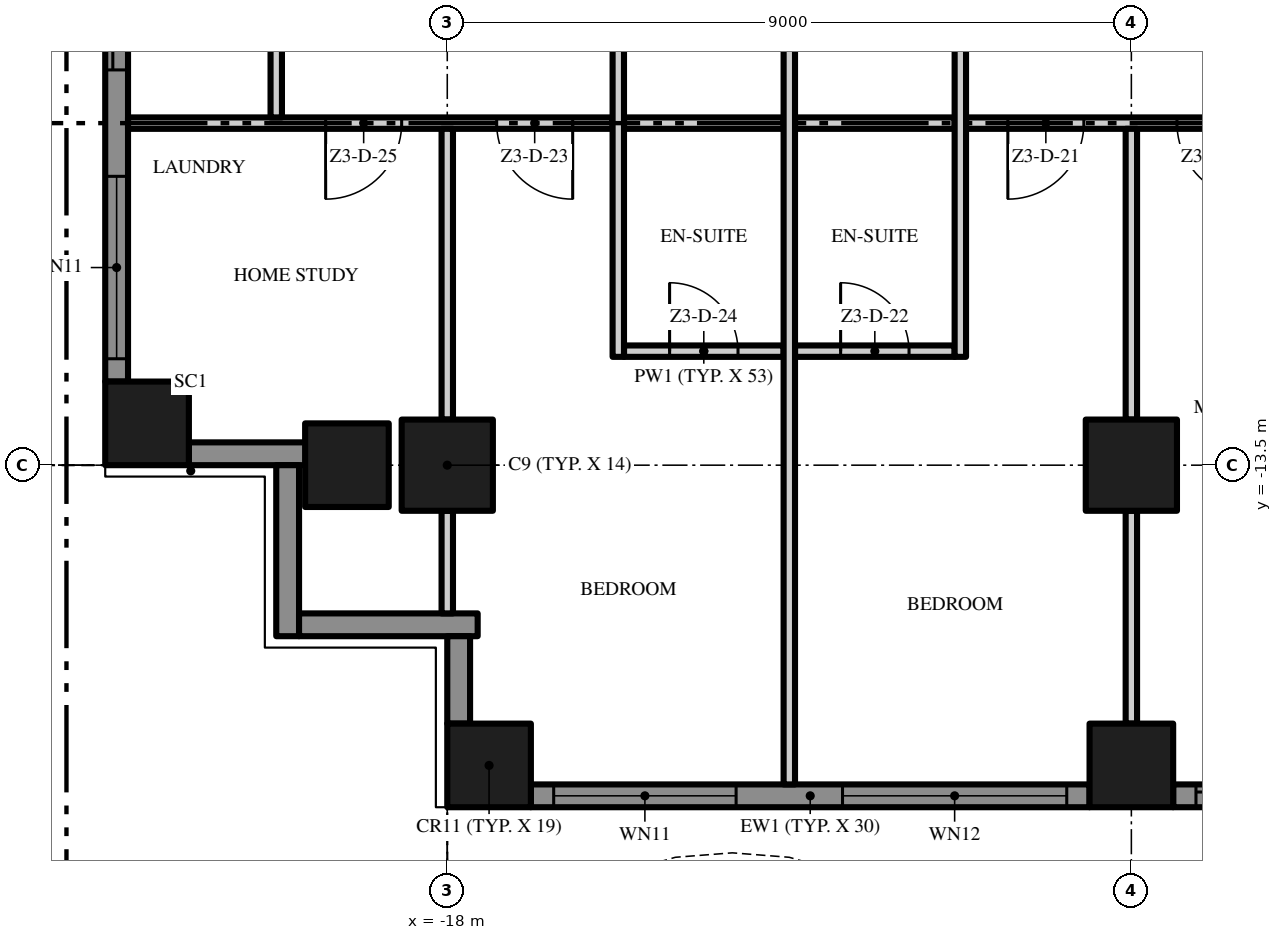
"""IFC4 building model, lengths in metres.
Left out: names, types, materials, properties, quantities, classifications, styles, units other than length and angle.
Written with IfcOpenShell. Run it as: python <this file> out.ifc"""

import sys

from ifc_helpers import new_model, si_unit, direction, frame, frame_2d, origin, origin_2d, place, context, subcontext, project, spatial, polyline, rectangle, outline, extrude, element, fill, save


model = new_model("IFC4")
c1 = context("Model", 3, precision=1e-05, world=origin(), true_north=direction((0.0, 1.0)))
c2 = subcontext(c1, "Body", "Model", "MODEL_VIEW")
j1 = project(units=[si_unit("LENGTHUNIT", "METRE"), si_unit("PLANEANGLEUNIT", "RADIAN")], contexts=[c1])
p1 = place(None, origin())
s1 = spatial("IfcSite", under=j1, at=p1, CompositionType="ELEMENT")
p2 = place(p1, origin())
s2 = spatial("IfcBuilding", under=s1, at=p2, CompositionType="ELEMENT")
p3 = place(p2, frame((0.0, 0.0, 159.2)))
s3 = spatial("IfcBuildingStorey", under=s2, at=p3, CompositionType="ELEMENT", Elevation=159.2)
p4 = place(p3, frame((-18.0, -13.5, 0.0), z_axis=(0.0, 0.0, 1.0), x_axis=(1.0, 0.0, 0.0)))
e1 = element("IfcColumn", 1, at=p4, inside=s3, PredefinedType="COLUMN", context=c2, shape_type="SweptSolid", body=[
    extrude(rectangle(XDim=1.2, YDim=1.2, at=origin_2d()), origin(), (0.0, 0.0, 1.0), 3.5),
])
for number, where, z_axis, x_axis in (
    (2, (-17.45, -17.45, 0.0), (0.0, 0.0, 1.0), (1.0, 0.0, 0.0)),
    (3, (-21.95, -12.95, 0.0), (0.0, 0.0, 1.0), (1.0, 0.0, 0.0)),
    (4, (-19.32, -13.5, 0.0), (0.0, 0.0, 1.0), (1.0, 0.0, 0.0)),
):
    element("IfcColumn", number, at=place(p3, frame(where, z_axis=z_axis, x_axis=x_axis)), inside=s3, PredefinedType="COLUMN", context=c2, shape_type="SweptSolid", body=[
        extrude(rectangle(XDim=1.1, YDim=1.1, at=origin_2d()), origin(), (0.0, 0.0, 1.0), 3.5),
    ])
p5 = place(p3, frame((-9.0, -13.5, 0.0), z_axis=(0.0, 0.0, 1.0), x_axis=(1.0, 0.0, 0.0)))
e5 = element("IfcColumn", 5, at=p5, inside=s3, PredefinedType="COLUMN", context=c2, shape_type="SweptSolid", body=[
    extrude(rectangle(XDim=1.2, YDim=1.2, at=origin_2d()), origin(), (0.0, 0.0, 1.0), 3.5),
])
p6 = place(p3, frame((-9.0, -17.45, 0.0), z_axis=(0.0, 0.0, 1.0), x_axis=(1.0, 0.0, 0.0)))
e6 = element("IfcColumn", 6, at=p6, inside=s3, PredefinedType="COLUMN", context=c2, shape_type="SweptSolid", body=[
    extrude(rectangle(XDim=1.1, YDim=1.1, at=origin_2d()), origin(), (0.0, 0.0, 1.0), 3.5),
])
p7 = place(p3, frame((-9.55, -17.85, 0.0), z_axis=(0.0, 0.0, 1.0), x_axis=(-1.0, 0.0, 0.0)))
e7 = element("IfcWall", 7, at=p7, inside=s3, PredefinedType="SOLIDWALL", context=c2, shape_type="SweptSolid", body=[
    extrude(rectangle(XDim=7.35, YDim=0.3, at=frame_2d((3.675, 0.0))), origin(), (0.0, 0.0, 1.0), 3.5),
])
p8 = place(p7, frame((4.65, 0.0, 0.45)))
e8 = element("IfcOpeningElement", 8, at=p8, cuts=e7, PredefinedType="OPENING", context=c2, shape_type="SweptSolid", body=[
    extrude(rectangle(XDim=2.4, YDim=2.65, at=frame_2d((1.2, 1.325))), frame((0.0, 0.16, 0.0), z_axis=(0.0, -1.0, 0.0), x_axis=(1.0, 0.0, 0.0)), (0.0, 0.0, 1.0), 0.32),
])
p9 = place(p7, frame((0.3, 0.0, 0.45)))
e9 = element("IfcOpeningElement", 9, at=p9, cuts=e7, PredefinedType="OPENING", context=c2, shape_type="SweptSolid", body=[
    extrude(rectangle(XDim=2.95, YDim=2.65, at=frame_2d((1.475, 1.325))), frame((0.0, 0.16, 0.0), z_axis=(0.0, -1.0, 0.0), x_axis=(1.0, 0.0, 0.0)), (0.0, 0.0, 1.0), 0.32),
])
p10 = place(p3, frame((-0.55, -17.85, 0.0), z_axis=(0.0, 0.0, 1.0), x_axis=(-1.0, 0.0, 0.0)))
e10 = element("IfcWall", 10, at=p10, inside=s3, PredefinedType="SOLIDWALL", context=c2, shape_type="SweptSolid", body=[
    extrude(rectangle(XDim=7.9, YDim=0.3, at=frame_2d((3.95, 0.0))), origin(), (0.0, 0.0, 1.0), 3.5),
])
p11 = place(p10, frame((4.65, 0.0, 0.0)))
e11 = element("IfcOpeningElement", 11, at=p11, cuts=e10, PredefinedType="OPENING", context=c2, shape_type="SweptSolid", body=[
    extrude(rectangle(XDim=2.95, YDim=2.4, at=frame_2d((1.475, 1.2))), frame((0.0, 0.16, 0.0), z_axis=(0.0, -1.0, 0.0), x_axis=(1.0, 0.0, 0.0)), (0.0, 0.0, 1.0), 0.32),
])
p12 = place(p10, frame((0.3, 0.0, 0.45)))
e12 = element("IfcOpeningElement", 12, at=p12, cuts=e10, PredefinedType="OPENING", context=c2, shape_type="SweptSolid", body=[
    extrude(rectangle(XDim=2.95, YDim=2.65, at=frame_2d((1.475, 1.325))), frame((0.0, 0.16, 0.0), z_axis=(0.0, -1.0, 0.0), x_axis=(1.0, 0.0, 0.0)), (0.0, 0.0, 1.0), 0.32),
])
p13 = place(p3, frame((-22.35, -12.4, 0.0), z_axis=(0.0, 0.0, 1.0), x_axis=(0.0, 1.0, 0.0)))
e13 = element("IfcWall", 13, at=p13, inside=s3, PredefinedType="SOLIDWALL", context=c2, shape_type="SweptSolid", body=[
    extrude(rectangle(XDim=7.35, YDim=0.3, at=frame_2d((3.675, 0.0))), origin(), (0.0, 0.0, 1.0), 3.5),
])
p14 = place(p13, frame((4.1, 0.0, 0.0)))
e14 = element("IfcOpeningElement", 14, at=p14, cuts=e13, PredefinedType="OPENING", context=c2, shape_type="SweptSolid", body=[
    extrude(rectangle(XDim=2.95, YDim=2.4, at=frame_2d((1.475, 1.2))), frame((0.0, 0.16, 0.0), z_axis=(0.0, -1.0, 0.0), x_axis=(1.0, 0.0, 0.0)), (0.0, 0.0, 1.0), 0.32),
])
p15 = place(p13, frame((0.3, 0.0, 0.45)))
e15 = element("IfcOpeningElement", 15, at=p15, cuts=e13, PredefinedType="OPENING", context=c2, shape_type="SweptSolid", body=[
    extrude(rectangle(XDim=2.4, YDim=2.65, at=frame_2d((1.2, 1.325))), frame((0.0, 0.16, 0.0), z_axis=(0.0, -1.0, 0.0), x_axis=(1.0, 0.0, 0.0)), (0.0, 0.0, 1.0), 0.32),
])
p16 = place(p3, frame((-19.85, -13.35, 0.0), z_axis=(0.0, 0.0, 1.0), x_axis=(-1.0, 0.0, 0.0)))
e16 = element("IfcWall", 16, at=p16, inside=s3, PredefinedType="SOLIDWALL", context=c2, shape_type="SweptSolid", body=[
    extrude(rectangle(XDim=1.55, YDim=0.3, at=frame_2d((0.775, 0.0))), origin(), (0.0, 0.0, 1.0), 3.5),
])
p17 = place(p3, frame((-20.1, -15.75, 0.0), z_axis=(0.0, 0.0, 1.0), x_axis=(0.0, 1.0, 0.0)))
e17 = element("IfcWall", 17, at=p17, inside=s3, PredefinedType="SOLIDWALL", context=c2, shape_type="SweptSolid", body=[
    extrude(rectangle(XDim=2.25, YDim=0.3, at=frame_2d((1.125, 0.0))), origin(), (0.0, 0.0, 1.0), 3.5),
])
p18 = place(p3, frame((-17.6, -15.6, 0.0), z_axis=(0.0, 0.0, 1.0), x_axis=(-1.0, 0.0, 0.0)))
e18 = element("IfcWall", 18, at=p18, inside=s3, PredefinedType="SOLIDWALL", context=c2, shape_type="SweptSolid", body=[
    extrude(rectangle(XDim=2.35, YDim=0.3, at=frame_2d((1.175, 0.0))), origin(), (0.0, 0.0, 1.0), 3.5),
])
p19 = place(p3, frame((-17.85, -16.9, 0.0), z_axis=(0.0, 0.0, 1.0), x_axis=(0.0, 1.0, 0.0)))
e19 = element("IfcWall", 19, at=p19, inside=s3, PredefinedType="SOLIDWALL", context=c2, shape_type="SweptSolid", body=[
    extrude(rectangle(XDim=1.15, YDim=0.3, at=frame_2d((0.575, 0.0))), origin(), (0.0, 0.0, 1.0), 3.5),
])
p20 = place(p3, origin())
e20 = element("IfcWall", 20, at=p20, inside=s3, PredefinedType="USERDEFINED", context=c2, shape_type="SweptSolid", body=[
    extrude(outline(polyline([(-18.0, -19.8), (-16.5, -19.095), (-15.0, -18.659), (-14.25, -18.6), (-13.5, -18.659), (-12.0, -19.095), (-10.5, -19.8), (-9.0, -20.505), (-7.5, -20.941), (-6.75, -21.0), (-6.0, -20.941), (-4.5, -20.505), (-3.0, -19.8), (-1.5, -19.095), (0.0, -18.659), (0.75, -18.6), (1.5, -18.659), (3.0, -19.095), (4.5, -19.8), (6.0, -20.505), (7.5, -20.941), (8.25, -21.0), (9.0, -20.941), (10.5, -20.505), (12.0, -19.8), (13.5, -19.095), (15.0, -18.659), (15.75, -18.6), (16.5, -18.659), (18.0, -19.095), (18.07, -18.855), (16.545, -18.411), (15.75, -18.349), (14.955, -18.411), (13.411, -18.86), (11.894, -19.574), (10.411, -20.271), (8.955, -20.694), (8.25, -20.749), (7.545, -20.694), (6.089, -20.271), (4.606, -19.574), (3.089, -18.86), (1.545, -18.411), (0.75, -18.349), (-0.045, -18.411), (-1.589, -18.86), (-3.106, -19.574), (-4.589, -20.271), (-6.045, -20.694), (-6.75, -20.749), (-7.455, -20.694), (-8.911, -20.271), (-10.394, -19.574), (-11.911, -18.86), (-13.455, -18.411), (-14.25, -18.349), (-15.045, -18.411), (-16.589, -18.86), (-18.106, -19.574), (-18.0, -19.8)])), origin(), (0.0, 0.0, 1.0), 0.9),
])
p21 = place(p3, origin())
e21 = element("IfcWall", 21, at=p21, inside=s3, PredefinedType="USERDEFINED", context=c2, shape_type="SweptSolid", body=[
    extrude(outline(polyline([(-24.3, 18.0), (-23.595, 16.5), (-23.159, 15.0), (-23.1, 14.25), (-23.159, 13.5), (-23.595, 12.0), (-24.3, 10.5), (-25.005, 9.0), (-25.441, 7.5), (-25.5, 6.75), (-25.441, 6.0), (-25.005, 4.5), (-24.3, 3.0), (-23.595, 1.5), (-23.159, 0.0), (-23.1, -0.75), (-23.159, -1.5), (-23.595, -3.0), (-24.3, -4.5), (-25.005, -6.0), (-25.441, -7.5), (-25.5, -8.25), (-25.441, -9.0), (-25.005, -10.5), (-24.3, -12.0), (-23.595, -13.5), (-23.368, -13.394), (-24.074, -11.894), (-24.771, -10.411), (-25.194, -8.955), (-25.249, -8.25), (-25.194, -7.545), (-24.771, -6.089), (-24.074, -4.606), (-23.36, -3.089), (-22.911, -1.545), (-22.849, -0.75), (-22.911, 0.045), (-23.36, 1.589), (-24.074, 3.106), (-24.771, 4.589), (-25.194, 6.045), (-25.249, 6.75), (-25.194, 7.455), (-24.771, 8.911), (-24.074, 10.394), (-23.36, 11.911), (-22.911, 13.455), (-22.849, 14.25), (-22.911, 15.045), (-23.36, 16.589), (-24.074, 18.106), (-24.3, 18.0)])), origin(), (0.0, 0.0, 1.0), 0.9),
])
p22 = place(p3, frame((-15.675, -12.0, 0.0), z_axis=(0.0, 0.0, 1.0), x_axis=(1.0, 0.0, 0.0)))
e22 = element("IfcWall", 22, at=p22, inside=s3, PredefinedType="PARTITIONING", context=c2, shape_type="SweptSolid", body=[
    extrude(rectangle(XDim=2.1, YDim=0.15, at=frame_2d((1.05, 0.0))), origin(), (0.0, 0.0, 1.0), 3.5),
])
p23 = place(p22, frame((0.6, 0.0, 0.0)))
e23 = element("IfcOpeningElement", 23, at=p23, cuts=e22, PredefinedType="OPENING", context=c2, shape_type="SweptSolid", body=[
    extrude(rectangle(XDim=0.9, YDim=2.1, at=frame_2d((0.45, 1.05))), frame((0.0, 0.085, 0.0), z_axis=(0.0, -1.0, 0.0), x_axis=(1.0, 0.0, 0.0)), (0.0, 0.0, 1.0), 0.17),
])
p24 = place(p3, frame((-13.425, -12.0, 0.0), z_axis=(0.0, 0.0, 1.0), x_axis=(1.0, 0.0, 0.0)))
e24 = element("IfcWall", 24, at=p24, inside=s3, PredefinedType="PARTITIONING", context=c2, shape_type="SweptSolid", body=[
    extrude(rectangle(XDim=2.1, YDim=0.15, at=frame_2d((1.05, 0.0))), origin(), (0.0, 0.0, 1.0), 3.5),
])
p25 = place(p24, frame((0.6, 0.0, 0.0)))
e25 = element("IfcOpeningElement", 25, at=p25, cuts=e24, PredefinedType="OPENING", context=c2, shape_type="SweptSolid", body=[
    extrude(rectangle(XDim=0.9, YDim=2.1, at=frame_2d((0.45, 1.05))), frame((0.0, 0.085, 0.0), z_axis=(0.0, -1.0, 0.0), x_axis=(1.0, 0.0, 0.0)), (0.0, 0.0, 1.0), 0.17),
])
p26 = place(p3, frame((-15.825, -9.0, 0.0), z_axis=(0.0, 0.0, 1.0), x_axis=(-1.0, 0.0, 0.0)))
e26 = element("IfcWall", 26, at=p26, inside=s3, PredefinedType="PARTITIONING", context=c2, shape_type="SweptSolid", body=[
    extrude(rectangle(XDim=6.375, YDim=0.15, at=frame_2d((3.188, 0.0))), origin(), (0.0, 0.0, 1.0), 3.5),
])
p27 = place(p26, frame((0.525, 0.0, 0.0)))
e27 = element("IfcOpeningElement", 27, at=p27, cuts=e26, PredefinedType="OPENING", context=c2, shape_type="SweptSolid", body=[
    extrude(rectangle(XDim=1.0, YDim=2.4, at=frame_2d((0.5, 1.2))), frame((0.0, 0.085, 0.0), z_axis=(0.0, -1.0, 0.0), x_axis=(1.0, 0.0, 0.0)), (0.0, 0.0, 1.0), 0.17),
])
p28 = place(p26, frame((2.775, 0.0, 0.0)))
e28 = element("IfcOpeningElement", 28, at=p28, cuts=e26, PredefinedType="OPENING", context=c2, shape_type="SweptSolid", body=[
    extrude(rectangle(XDim=1.0, YDim=2.4, at=frame_2d((0.5, 1.2))), frame((0.0, 0.085, 0.0), z_axis=(0.0, -1.0, 0.0), x_axis=(1.0, 0.0, 0.0)), (0.0, 0.0, 1.0), 0.17),
])
for number, where, z_axis, x_axis in (
    (29, (-15.675, -9.0, 0.0), (0.0, 0.0, 1.0), (1.0, 0.0, 0.0)),
    (30, (-13.425, -9.0, 0.0), (0.0, 0.0, 1.0), (1.0, 0.0, 0.0)),
):
    element("IfcWall", number, at=place(p3, frame(where, z_axis=z_axis, x_axis=x_axis)), inside=s3, PredefinedType="PARTITIONING", context=c2, shape_type="SweptSolid", body=[
        extrude(rectangle(XDim=2.1, YDim=0.15, at=frame_2d((1.05, 0.0))), origin(), (0.0, 0.0, 1.0), 3.5),
    ])
p29 = place(p3, frame((-6.825, -9.0, 0.0), z_axis=(0.0, 0.0, 1.0), x_axis=(-1.0, 0.0, 0.0)))
e31 = element("IfcWall", 31, at=p29, inside=s3, PredefinedType="PARTITIONING", context=c2, shape_type="SweptSolid", body=[
    extrude(rectangle(XDim=4.35, YDim=0.15, at=frame_2d((2.175, 0.0))), origin(), (0.0, 0.0, 1.0), 3.5),
])
p30 = place(p29, frame((0.575, 0.0, 0.0)))
e32 = element("IfcOpeningElement", 32, at=p30, cuts=e31, PredefinedType="OPENING", context=c2, shape_type="SweptSolid", body=[
    extrude(rectangle(XDim=1.0, YDim=2.4, at=frame_2d((0.5, 1.2))), frame((0.0, 0.085, 0.0), z_axis=(0.0, -1.0, 0.0), x_axis=(1.0, 0.0, 0.0)), (0.0, 0.0, 1.0), 0.17),
])
p31 = place(p29, frame((2.8, 0.0, 0.0)))
e33 = element("IfcOpeningElement", 33, at=p31, cuts=e31, PredefinedType="OPENING", context=c2, shape_type="SweptSolid", body=[
    extrude(rectangle(XDim=1.0, YDim=2.4, at=frame_2d((0.5, 1.2))), frame((0.0, 0.085, 0.0), z_axis=(0.0, -1.0, 0.0), x_axis=(1.0, 0.0, 0.0)), (0.0, 0.0, 1.0), 0.17),
])
p32 = place(p3, frame((-20.25, -8.925, 0.0), z_axis=(0.0, 0.0, 1.0), x_axis=(0.0, 1.0, 0.0)))
e34 = element("IfcWall", 34, at=p32, inside=s3, PredefinedType="PARTITIONING", context=c2, shape_type="SweptSolid", body=[
    extrude(rectangle(XDim=4.5, YDim=0.15, at=frame_2d((2.25, 0.0))), origin(), (0.0, 0.0, 1.0), 3.5),
])
p33 = place(p32, frame((1.75, 0.0, 0.0)))
e35 = element("IfcOpeningElement", 35, at=p33, cuts=e34, PredefinedType="OPENING", context=c2, shape_type="SweptSolid", body=[
    extrude(rectangle(XDim=0.9, YDim=2.1, at=frame_2d((0.45, 1.05))), frame((0.0, 0.085, 0.0), z_axis=(0.0, -1.0, 0.0), x_axis=(1.0, 0.0, 0.0)), (0.0, 0.0, 1.0), 0.17),
])
p34 = place(p3, frame((-18.0, -15.45, 0.0), z_axis=(0.0, 0.0, 1.0), x_axis=(0.0, 1.0, 0.0)))
e36 = element("IfcWall", 36, at=p34, inside=s3, PredefinedType="PARTITIONING", context=c2, shape_type="SweptSolid", body=[
    extrude(rectangle(XDim=1.35, YDim=0.15, at=frame_2d((0.675, 0.0))), origin(), (0.0, 0.0, 1.0), 3.5),
])
p35 = place(p3, frame((-18.0, -12.9, 0.0), z_axis=(0.0, 0.0, 1.0), x_axis=(0.0, 1.0, 0.0)))
e37 = element("IfcWall", 37, at=p35, inside=s3, PredefinedType="PARTITIONING", context=c2, shape_type="SweptSolid", body=[
    extrude(rectangle(XDim=3.825, YDim=0.15, at=frame_2d((1.913, 0.0))), origin(), (0.0, 0.0, 1.0), 3.5),
])
p36 = place(p3, frame((-15.75, -12.075, 0.0), z_axis=(0.0, 0.0, 1.0), x_axis=(0.0, 1.0, 0.0)))
e38 = element("IfcWall", 38, at=p36, inside=s3, PredefinedType="PARTITIONING", context=c2, shape_type="SweptSolid", body=[
    extrude(rectangle(XDim=7.65, YDim=0.15, at=frame_2d((3.825, 0.0))), origin(), (0.0, 0.0, 1.0), 3.5),
])
p37 = place(p3, frame((-13.5, -17.7, 0.0), z_axis=(0.0, 0.0, 1.0), x_axis=(0.0, 1.0, 0.0)))
e39 = element("IfcWall", 39, at=p37, inside=s3, PredefinedType="PARTITIONING", context=c2, shape_type="SweptSolid", body=[
    extrude(rectangle(XDim=13.125, YDim=0.15, at=frame_2d((6.562, 0.0))), origin(), (0.0, 0.0, 1.0), 3.5),
])
p38 = place(p3, frame((-11.25, -12.075, 0.0), z_axis=(0.0, 0.0, 1.0), x_axis=(0.0, 1.0, 0.0)))
e40 = element("IfcWall", 40, at=p38, inside=s3, PredefinedType="PARTITIONING", context=c2, shape_type="SweptSolid", body=[
    extrude(rectangle(XDim=7.65, YDim=0.15, at=frame_2d((3.825, 0.0))), origin(), (0.0, 0.0, 1.0), 3.5),
])
p39 = place(p3, frame((-9.0, -16.9, 0.0), z_axis=(0.0, 0.0, 1.0), x_axis=(0.0, 1.0, 0.0)))
e41 = element("IfcWall", 41, at=p39, inside=s3, PredefinedType="PARTITIONING", context=c2, shape_type="SweptSolid", body=[
    extrude(rectangle(XDim=2.8, YDim=0.15, at=frame_2d((1.4, 0.0))), origin(), (0.0, 0.0, 1.0), 3.5),
])
p40 = place(p3, frame((-9.0, -12.9, 0.0), z_axis=(0.0, 0.0, 1.0), x_axis=(0.0, 1.0, 0.0)))
e42 = element("IfcWall", 42, at=p40, inside=s3, PredefinedType="PARTITIONING", context=c2, shape_type="SweptSolid", body=[
    extrude(rectangle(XDim=3.825, YDim=0.15, at=frame_2d((1.913, 0.0))), origin(), (0.0, 0.0, 1.0), 3.5),
])
p41 = place(p8, origin())
e43 = element("IfcWindow", 43, at=p41, inside=s3, PartitioningType="SINGLE_PANEL", PredefinedType="WINDOW", context=c2, shape_type="SweptSolid", body=[
    extrude(rectangle(XDim=2.4, YDim=2.65, at=frame_2d((1.2, 1.325))), frame((0.0, 0.03, 0.0), z_axis=(0.0, -1.0, 0.0), x_axis=(1.0, 0.0, 0.0)), (0.0, 0.0, 1.0), 0.06),
])
fill(e8, e43)
p42 = place(p9, origin())
e44 = element("IfcWindow", 44, at=p42, inside=s3, PartitioningType="SINGLE_PANEL", PredefinedType="WINDOW", context=c2, shape_type="SweptSolid", body=[
    extrude(rectangle(XDim=2.95, YDim=2.65, at=frame_2d((1.475, 1.325))), frame((0.0, 0.03, 0.0), z_axis=(0.0, -1.0, 0.0), x_axis=(1.0, 0.0, 0.0)), (0.0, 0.0, 1.0), 0.06),
])
fill(e9, e44)
p43 = place(p11, origin())
e45 = element("IfcDoor", 45, at=p43, inside=s3, OperationType="SINGLE_SWING_LEFT", PredefinedType="DOOR", context=c2, shape_type="SweptSolid", body=[
    extrude(rectangle(XDim=2.95, YDim=2.4, at=frame_2d((1.475, 1.2))), frame((0.0, 0.025, 0.0), z_axis=(0.0, -1.0, 0.0), x_axis=(1.0, 0.0, 0.0)), (0.0, 0.0, 1.0), 0.05),
])
fill(e11, e45)
p44 = place(p14, origin())
e46 = element("IfcDoor", 46, at=p44, inside=s3, OperationType="SINGLE_SWING_LEFT", PredefinedType="DOOR", context=c2, shape_type="SweptSolid", body=[
    extrude(rectangle(XDim=2.95, YDim=2.4, at=frame_2d((1.475, 1.2))), frame((0.0, 0.025, 0.0), z_axis=(0.0, -1.0, 0.0), x_axis=(1.0, 0.0, 0.0)), (0.0, 0.0, 1.0), 0.05),
])
fill(e14, e46)
p45 = place(p15, origin())
e47 = element("IfcWindow", 47, at=p45, inside=s3, PartitioningType="SINGLE_PANEL", PredefinedType="WINDOW", context=c2, shape_type="SweptSolid", body=[
    extrude(rectangle(XDim=2.4, YDim=2.65, at=frame_2d((1.2, 1.325))), frame((0.0, 0.03, 0.0), z_axis=(0.0, -1.0, 0.0), x_axis=(1.0, 0.0, 0.0)), (0.0, 0.0, 1.0), 0.06),
])
fill(e15, e47)
p46 = place(p30, origin())
e48 = element("IfcDoor", 48, at=p46, inside=s3, OperationType="SINGLE_SWING_LEFT", PredefinedType="DOOR", context=c2, shape_type="SweptSolid", body=[
    extrude(rectangle(XDim=1.0, YDim=2.4, at=frame_2d((0.5, 1.2))), frame((0.0, 0.025, 0.0), z_axis=(0.0, -1.0, 0.0), x_axis=(1.0, 0.0, 0.0)), (0.0, 0.0, 1.0), 0.05),
])
fill(e32, e48)
p47 = place(p31, origin())
e49 = element("IfcDoor", 49, at=p47, inside=s3, OperationType="SINGLE_SWING_RIGHT", PredefinedType="DOOR", context=c2, shape_type="SweptSolid", body=[
    extrude(rectangle(XDim=1.0, YDim=2.4, at=frame_2d((0.5, 1.2))), frame((0.0, 0.025, 0.0), z_axis=(0.0, -1.0, 0.0), x_axis=(1.0, 0.0, 0.0)), (0.0, 0.0, 1.0), 0.05),
])
fill(e33, e49)
p48 = place(p25, origin())
e50 = element("IfcDoor", 50, at=p48, inside=s3, OperationType="SINGLE_SWING_LEFT", PredefinedType="DOOR", context=c2, shape_type="SweptSolid", body=[
    extrude(rectangle(XDim=0.9, YDim=2.1, at=frame_2d((0.45, 1.05))), frame((0.0, 0.025, 0.0), z_axis=(0.0, -1.0, 0.0), x_axis=(1.0, 0.0, 0.0)), (0.0, 0.0, 1.0), 0.05),
])
fill(e25, e50)
p49 = place(p27, origin())
e51 = element("IfcDoor", 51, at=p49, inside=s3, OperationType="SINGLE_SWING_LEFT", PredefinedType="DOOR", context=c2, shape_type="SweptSolid", body=[
    extrude(rectangle(XDim=1.0, YDim=2.4, at=frame_2d((0.5, 1.2))), frame((0.0, 0.025, 0.0), z_axis=(0.0, -1.0, 0.0), x_axis=(1.0, 0.0, 0.0)), (0.0, 0.0, 1.0), 0.05),
])
fill(e27, e51)
p50 = place(p23, origin())
e52 = element("IfcDoor", 52, at=p50, inside=s3, OperationType="SINGLE_SWING_LEFT", PredefinedType="DOOR", context=c2, shape_type="SweptSolid", body=[
    extrude(rectangle(XDim=0.9, YDim=2.1, at=frame_2d((0.45, 1.05))), frame((0.0, 0.025, 0.0), z_axis=(0.0, -1.0, 0.0), x_axis=(1.0, 0.0, 0.0)), (0.0, 0.0, 1.0), 0.05),
])
fill(e23, e52)
p51 = place(p28, origin())
e53 = element("IfcDoor", 53, at=p51, inside=s3, OperationType="SINGLE_SWING_RIGHT", PredefinedType="DOOR", context=c2, shape_type="SweptSolid", body=[
    extrude(rectangle(XDim=1.0, YDim=2.4, at=frame_2d((0.5, 1.2))), frame((0.0, 0.025, 0.0), z_axis=(0.0, -1.0, 0.0), x_axis=(1.0, 0.0, 0.0)), (0.0, 0.0, 1.0), 0.05),
])
fill(e28, e53)
save(model, sys.argv[1])
